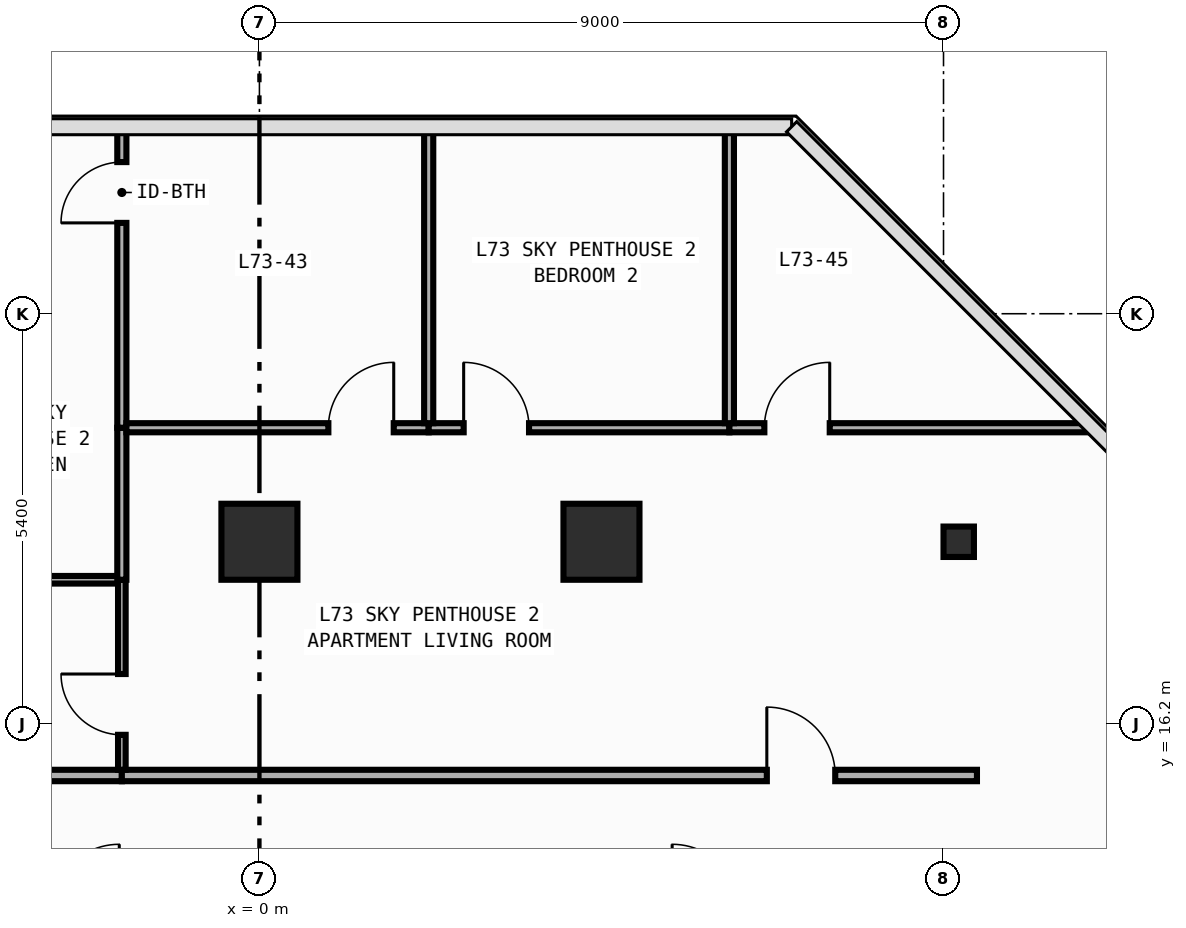
"""IFC4 building model, lengths in metres.
Left out: names, types, materials, properties, quantities, classifications, styles, units other than length and angle.
Written with IfcOpenShell. Run it as: python <this file> out.ifc"""

import sys

from ifc_helpers import new_model, si_unit, direction, frame, frame_2d, origin, origin_2d, place, context, subcontext, project, spatial, rectangle, circle, i_section, extrude, element, fill, save


model = new_model("IFC4")
c1 = context("Model", 3, precision=1e-05, world=origin(), true_north=direction((0.0, 1.0)))
c2 = subcontext(c1, "Body", "Model", "MODEL_VIEW")
j1 = project(units=[si_unit("LENGTHUNIT", "METRE"), si_unit("PLANEANGLEUNIT", "RADIAN")], contexts=[c1])
p1 = place(None, origin())
s1 = spatial("IfcSite", under=j1, at=p1, CompositionType="ELEMENT")
p2 = place(p1, origin())
s2 = spatial("IfcBuilding", under=s1, at=p2, CompositionType="ELEMENT")
p3 = place(p2, frame((0.0, 0.0, 304.2)))
s3 = spatial("IfcBuildingStorey", under=s2, at=p3, CompositionType="ELEMENT", Elevation=304.2)
p4 = place(p3, frame((9.2, 18.6, 0.0), z_axis=(0.0, 0.0, 1.0), x_axis=(1.0, 0.0, 0.0)))
e1 = element("IfcColumn", 1, at=p4, inside=s3, PredefinedType="COLUMN", context=c2, shape_type="SweptSolid", body=[
    extrude(i_section(OverallWidth=0.4, OverallDepth=0.4, WebThickness=0.013, FlangeThickness=0.021, FilletRadius=0.022, at=origin_2d()), origin(), (0.0, 0.0, 1.0), 3.8),
])
for number, where, z_axis, x_axis in (
    (2, (0.0, 18.6, 0.0), (0.0, 0.0, 1.0), (1.0, 0.0, 0.0)),
    (3, (4.5, 18.6, 0.0), (0.0, 0.0, 1.0), (1.0, 0.0, 0.0)),
):
    element("IfcColumn", number, at=place(p3, frame(where, z_axis=z_axis, x_axis=x_axis)), inside=s3, PredefinedType="COLUMN", context=c2, shape_type="SweptSolid", body=[
        extrude(circle(Radius=0.5, at=origin_2d()), origin(), (0.0, 0.0, 1.0), 3.8),
    ])
p5 = place(p3, frame((-4.4, 15.525, 0.0), z_axis=(0.0, 0.0, 1.0), x_axis=(1.0, 0.0, 0.0)))
e4 = element("IfcWall", 4, at=p5, inside=s3, PredefinedType="PARTITIONING", context=c2, shape_type="SweptSolid", body=[
    extrude(rectangle(XDim=2.59, YDim=0.15, at=frame_2d((1.295, 0.0))), origin(), (0.0, 0.0, 1.0), 3.54),
])
p6 = place(p3, frame((-1.81, 15.525, 0.0), z_axis=(0.0, 0.0, 1.0), x_axis=(1.0, 0.0, 0.0)))
e5 = element("IfcWall", 5, at=p6, inside=s3, PredefinedType="PARTITIONING", context=c2, shape_type="SweptSolid", body=[
    extrude(rectangle(XDim=11.25, YDim=0.15, at=frame_2d((5.625, 0.0))), origin(), (0.0, 0.0, 1.0), 3.54),
])
p7 = place(p6, frame((8.486, 0.0, 0.0)))
e6 = element("IfcOpeningElement", 6, at=p7, cuts=e5, PredefinedType="OPENING", context=c2, shape_type="SweptSolid", body=[
    extrude(rectangle(XDim=0.9, YDim=2.15, at=frame_2d((0.45, 1.075))), frame((0.0, 0.085, 0.0), z_axis=(0.0, -1.0, 0.0), x_axis=(1.0, 0.0, 0.0)), (0.0, 0.0, 1.0), 0.17),
])
p8 = place(p3, frame((-4.33, 18.1, 0.0), z_axis=(0.0, 0.0, 1.0), x_axis=(1.0, 0.0, 0.0)))
e7 = element("IfcWall", 7, at=p8, inside=s3, PredefinedType="PARTITIONING", context=c2, shape_type="SweptSolid", body=[
    extrude(rectangle(XDim=2.47, YDim=0.1, at=frame_2d((1.235, 0.0))), origin(), (0.0, 0.0, 1.0), 3.54),
])
p9 = place(p3, frame((-1.81, 15.6, 0.0), z_axis=(0.0, 0.0, 1.0), x_axis=(0.0, 1.0, 0.0)))
e8 = element("IfcWall", 8, at=p9, inside=s3, PredefinedType="PARTITIONING", context=c2, shape_type="SweptSolid", body=[
    extrude(rectangle(XDim=2.5, YDim=0.1, at=frame_2d((1.25, 0.0))), origin(), (0.0, 0.0, 1.0), 3.54),
])
p10 = place(p9, frame((0.46, 0.0, 0.0)))
e9 = element("IfcOpeningElement", 9, at=p10, cuts=e8, PredefinedType="OPENING", context=c2, shape_type="SweptSolid", body=[
    extrude(rectangle(XDim=0.8, YDim=2.1, at=frame_2d((0.4, 1.05))), frame((0.0, 0.06, 0.0), z_axis=(0.0, -1.0, 0.0), x_axis=(1.0, 0.0, 0.0)), (0.0, 0.0, 1.0), 0.12),
])
p11 = place(p3, frame((-1.81, 18.1, 0.0), z_axis=(0.0, 0.0, 1.0), x_axis=(0.0, 1.0, 0.0)))
e10 = element("IfcWall", 10, at=p11, inside=s3, PredefinedType="PARTITIONING", context=c2, shape_type="SweptSolid", body=[
    extrude(rectangle(XDim=2.0, YDim=0.12, at=frame_2d((1.0, 0.0))), origin(), (0.0, 0.0, 1.0), 3.54),
])
p12 = place(p3, frame((-1.81, 20.1, 0.0), z_axis=(0.0, 0.0, 1.0), x_axis=(0.0, 1.0, 0.0)))
e11 = element("IfcWall", 11, at=p12, inside=s3, PredefinedType="PARTITIONING", context=c2, shape_type="SweptSolid", body=[
    extrude(rectangle(XDim=3.955, YDim=0.12, at=frame_2d((1.978, 0.0))), origin(), (0.0, 0.0, 1.0), 3.54),
])
p13 = place(p12, frame((2.695, 0.0, 0.0)))
e12 = element("IfcOpeningElement", 12, at=p13, cuts=e11, PredefinedType="OPENING", context=c2, shape_type="SweptSolid", body=[
    extrude(rectangle(XDim=0.8, YDim=2.1, at=frame_2d((0.4, 1.05))), frame((0.0, 0.07, 0.0), z_axis=(0.0, -1.0, 0.0), x_axis=(1.0, 0.0, 0.0)), (0.0, 0.0, 1.0), 0.14),
])
p14 = place(p3, frame((-1.75, 20.1, 0.0), z_axis=(0.0, 0.0, 1.0), x_axis=(1.0, 0.0, 0.0)))
e13 = element("IfcWall", 13, at=p14, inside=s3, PredefinedType="PARTITIONING", context=c2, shape_type="SweptSolid", body=[
    extrude(rectangle(XDim=3.977, YDim=0.12, at=frame_2d((1.989, 0.0))), origin(), (0.0, 0.0, 1.0), 3.54),
])
p15 = place(p14, frame((2.657, 0.0, 0.0)))
e14 = element("IfcOpeningElement", 14, at=p15, cuts=e13, PredefinedType="OPENING", context=c2, shape_type="SweptSolid", body=[
    extrude(rectangle(XDim=0.86, YDim=2.15, at=frame_2d((0.43, 1.075))), frame((0.0, 0.07, 0.0), z_axis=(0.0, -1.0, 0.0), x_axis=(1.0, 0.0, 0.0)), (0.0, 0.0, 1.0), 0.14),
])
p16 = place(p3, frame((2.227, 20.1, 0.0), z_axis=(0.0, 0.0, 1.0), x_axis=(1.0, 0.0, 0.0)))
e15 = element("IfcWall", 15, at=p16, inside=s3, PredefinedType="PARTITIONING", context=c2, shape_type="SweptSolid", body=[
    extrude(rectangle(XDim=3.956, YDim=0.12, at=frame_2d((1.978, 0.0))), origin(), (0.0, 0.0, 1.0), 3.54),
])
p17 = place(p16, frame((0.46, 0.0, 0.0)))
e16 = element("IfcOpeningElement", 16, at=p17, cuts=e15, PredefinedType="OPENING", context=c2, shape_type="SweptSolid", body=[
    extrude(rectangle(XDim=0.86, YDim=2.15, at=frame_2d((0.43, 1.075))), frame((0.0, 0.07, 0.0), z_axis=(0.0, -1.0, 0.0), x_axis=(1.0, 0.0, 0.0)), (0.0, 0.0, 1.0), 0.14),
])
p18 = place(p3, frame((6.183, 20.1, 0.0), z_axis=(0.0, 0.0, 1.0), x_axis=(1.0, 0.0, 0.0)))
e17 = element("IfcWall", 17, at=p18, inside=s3, PredefinedType="PARTITIONING", context=c2, shape_type="SweptSolid", body=[
    extrude(rectangle(XDim=4.774, YDim=0.12, at=frame_2d((2.387, 0.0))), origin(), (0.0, 0.0, 1.0), 3.54),
])
p19 = place(p18, frame((0.46, 0.0, 0.0)))
e18 = element("IfcOpeningElement", 18, at=p19, cuts=e17, PredefinedType="OPENING", context=c2, shape_type="SweptSolid", body=[
    extrude(rectangle(XDim=0.86, YDim=2.15, at=frame_2d((0.43, 1.075))), frame((0.0, 0.07, 0.0), z_axis=(0.0, -1.0, 0.0), x_axis=(1.0, 0.0, 0.0)), (0.0, 0.0, 1.0), 0.14),
])
for number, where, z_axis, x_axis in (
    (19, (2.227, 20.16, 0.0), (0.0, 0.0, 1.0), (0.0, 1.0, 0.0)),
    (20, (6.183, 20.16, 0.0), (0.0, 0.0, 1.0), (0.0, 1.0, 0.0)),
):
    element("IfcWall", number, at=place(p3, frame(where, z_axis=z_axis, x_axis=x_axis)), inside=s3, PredefinedType="PARTITIONING", context=c2, shape_type="SweptSolid", body=[
        extrude(rectangle(XDim=3.895, YDim=0.12, at=frame_2d((1.948, 0.0))), origin(), (0.0, 0.0, 1.0), 3.54),
    ])
p20 = place(p7, origin())
e21 = element("IfcDoor", 21, at=p20, inside=s3, OperationType="SINGLE_SWING_LEFT", PredefinedType="DOOR", context=c2, shape_type="SweptSolid", body=[
    extrude(rectangle(XDim=0.9, YDim=2.15, at=frame_2d((0.45, 1.075))), frame((0.0, 0.025, 0.0), z_axis=(0.0, -1.0, 0.0), x_axis=(1.0, 0.0, 0.0)), (0.0, 0.0, 1.0), 0.05),
])
fill(e6, e21)
p21 = place(p10, origin())
e22 = element("IfcDoor", 22, at=p21, inside=s3, OperationType="SINGLE_SWING_RIGHT", PredefinedType="DOOR", context=c2, shape_type="SweptSolid", body=[
    extrude(rectangle(XDim=0.8, YDim=2.1, at=frame_2d((0.4, 1.05))), frame((0.0, 0.025, 0.0), z_axis=(0.0, -1.0, 0.0), x_axis=(1.0, 0.0, 0.0)), (0.0, 0.0, 1.0), 0.05),
])
fill(e9, e22)
p22 = place(p15, origin())
e23 = element("IfcDoor", 23, at=p22, inside=s3, OperationType="SINGLE_SWING_RIGHT", PredefinedType="DOOR", context=c2, shape_type="SweptSolid", body=[
    extrude(rectangle(XDim=0.86, YDim=2.15, at=frame_2d((0.43, 1.075))), frame((0.0, 0.025, 0.0), z_axis=(0.0, -1.0, 0.0), x_axis=(1.0, 0.0, 0.0)), (0.0, 0.0, 1.0), 0.05),
])
fill(e14, e23)
p23 = place(p17, origin())
e24 = element("IfcDoor", 24, at=p23, inside=s3, OperationType="SINGLE_SWING_LEFT", PredefinedType="DOOR", context=c2, shape_type="SweptSolid", body=[
    extrude(rectangle(XDim=0.86, YDim=2.15, at=frame_2d((0.43, 1.075))), frame((0.0, 0.025, 0.0), z_axis=(0.0, -1.0, 0.0), x_axis=(1.0, 0.0, 0.0)), (0.0, 0.0, 1.0), 0.05),
])
fill(e16, e24)
p24 = place(p19, origin())
e25 = element("IfcDoor", 25, at=p24, inside=s3, OperationType="SINGLE_SWING_RIGHT", PredefinedType="DOOR", context=c2, shape_type="SweptSolid", body=[
    extrude(rectangle(XDim=0.86, YDim=2.15, at=frame_2d((0.43, 1.075))), frame((0.0, 0.025, 0.0), z_axis=(0.0, -1.0, 0.0), x_axis=(1.0, 0.0, 0.0)), (0.0, 0.0, 1.0), 0.05),
])
fill(e18, e25)
p25 = place(p13, origin())
e26 = element("IfcDoor", 26, at=p25, inside=s3, OperationType="SINGLE_SWING_LEFT", PredefinedType="DOOR", context=c2, shape_type="SweptSolid", body=[
    extrude(rectangle(XDim=0.8, YDim=2.1, at=frame_2d((0.4, 1.05))), frame((0.0, 0.025, 0.0), z_axis=(0.0, -1.0, 0.0), x_axis=(1.0, 0.0, 0.0)), (0.0, 0.0, 1.0), 0.05),
])
fill(e12, e26)
save(model, sys.argv[1])
